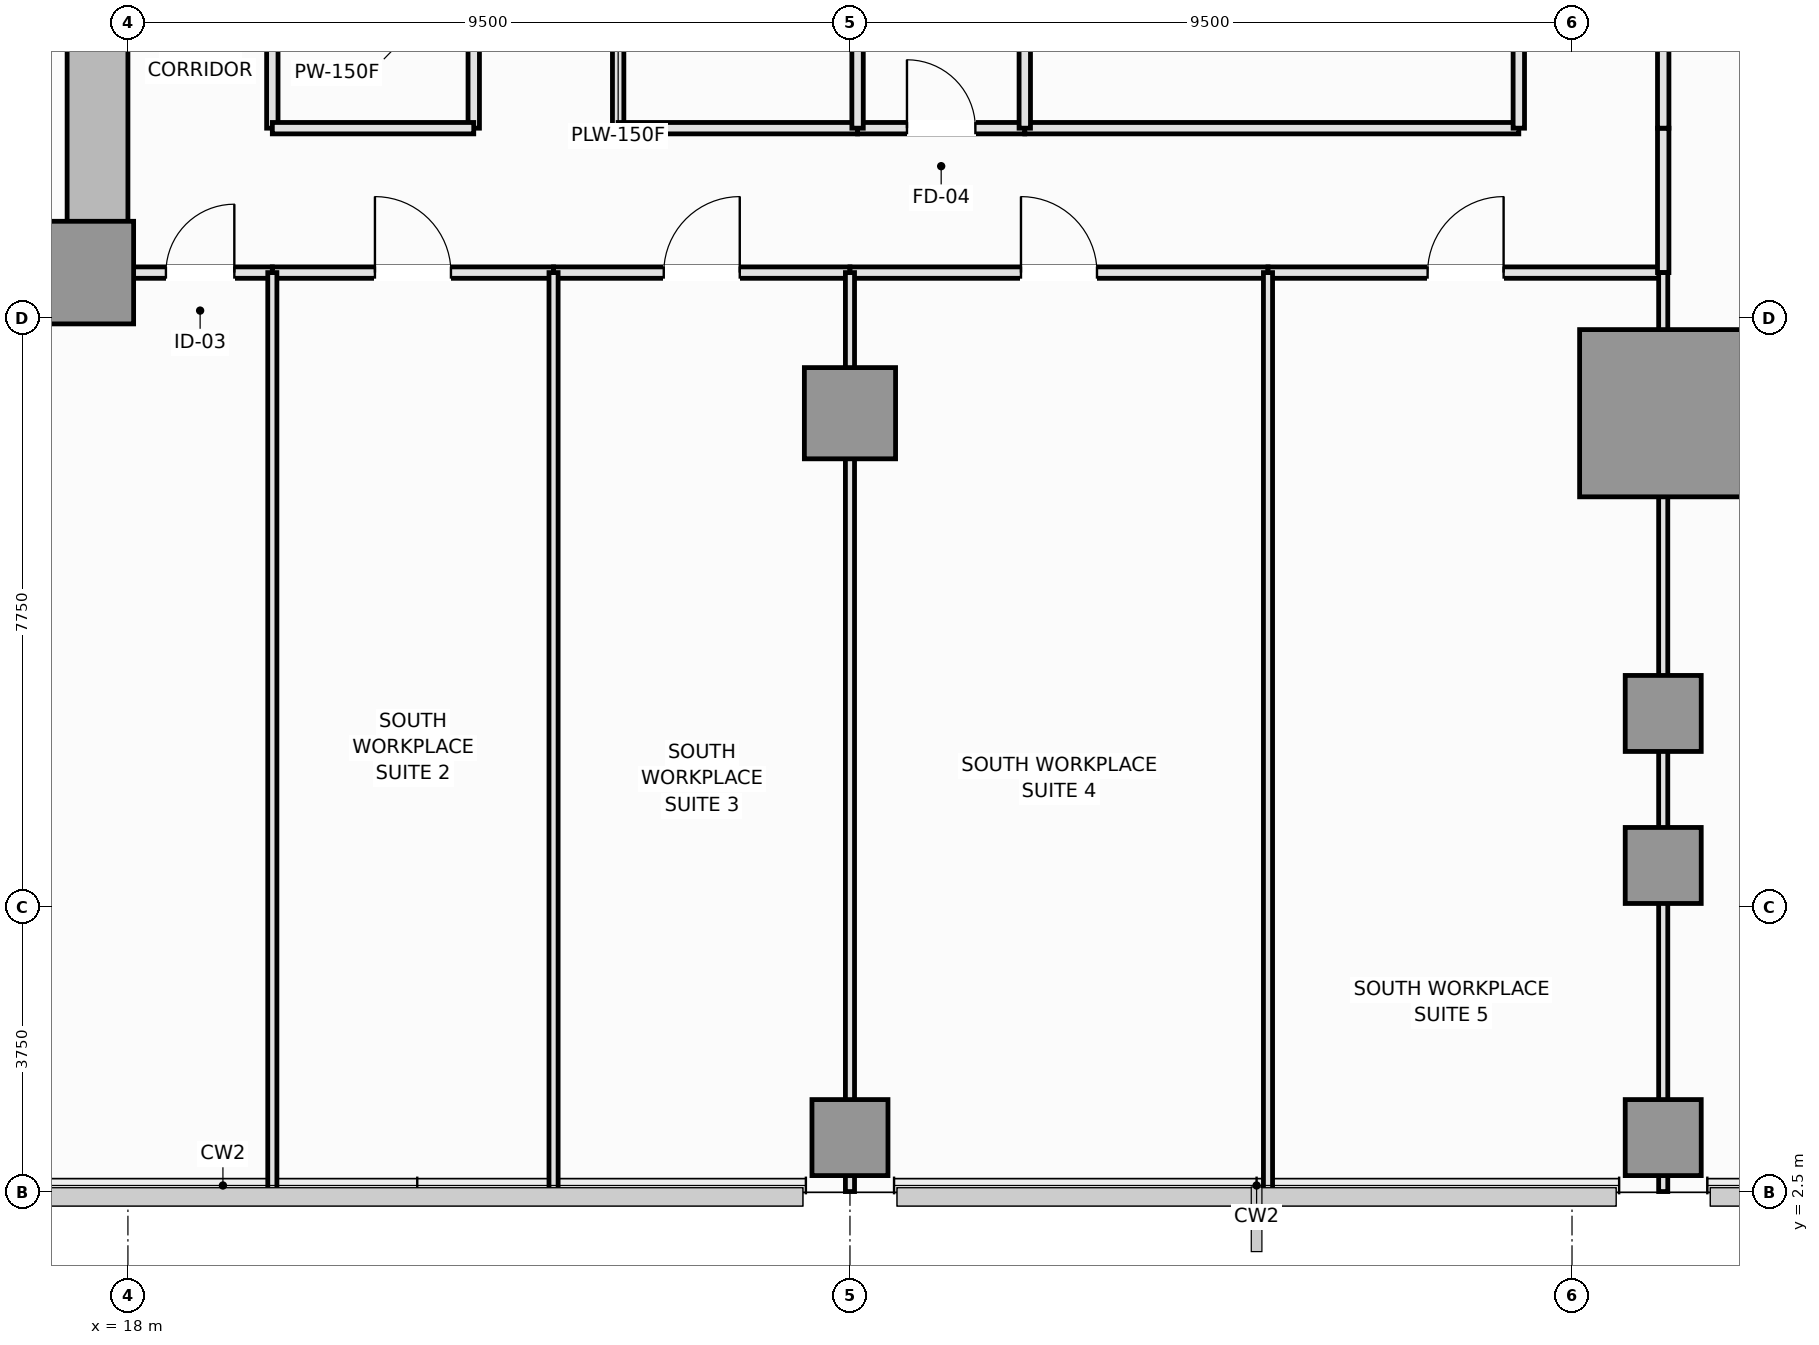
"""IFC4 building model, lengths in metres.
Left out: names, types, materials, properties, quantities, classifications, styles, units other than length and angle.
Written with IfcOpenShell. Run it as: python <this file> out.ifc"""

import sys

from ifc_helpers import new_model, si_unit, direction, frame, frame_2d, origin, origin_2d, place, context, subcontext, project, spatial, rectangle, extrude, element, fill, save


model = new_model("IFC4")
c1 = context("Model", 3, precision=1e-05, world=origin(), true_north=direction((0.0, 1.0)))
c2 = subcontext(c1, "Body", "Model", "MODEL_VIEW")
j1 = project(units=[si_unit("LENGTHUNIT", "METRE"), si_unit("PLANEANGLEUNIT", "RADIAN")], contexts=[c1])
p1 = place(None, origin())
s1 = spatial("IfcSite", under=j1, at=p1, CompositionType="ELEMENT")
p2 = place(p1, origin())
s2 = spatial("IfcBuilding", under=s1, at=p2, CompositionType="ELEMENT")
p3 = place(p2, frame((0.0, 0.0, 61.1)))
s3 = spatial("IfcBuildingStorey", under=s2, at=p3, CompositionType="ELEMENT", Elevation=61.1)
p4 = place(p3, frame((4.5, 14.4, 0.0), z_axis=(0.0, 0.0, 1.0), x_axis=(1.0, 0.0, 0.0)))
e1 = element("IfcWall", 1, at=p4, inside=s3, PredefinedType="SHEAR", context=c2, shape_type="SweptSolid", body=[
    extrude(rectangle(XDim=13.5, YDim=0.8, at=frame_2d((6.75, 0.0))), origin(), (0.0, 0.0, 1.0), 3.55),
])
p5 = place(p3, frame((17.6, 14.8, 0.0), z_axis=(0.0, 0.0, 1.0), x_axis=(0.0, 1.0, 0.0)))
e2 = element("IfcWall", 2, at=p5, inside=s3, PredefinedType="SHEAR", context=c2, shape_type="SweptSolid", body=[
    extrude(rectangle(XDim=8.65, YDim=0.8, at=frame_2d((4.325, 0.0))), origin(), (0.0, 0.0, 1.0), 3.55),
])
p6 = place(p5, frame((4.1, 0.0, 0.0)))
e3 = element("IfcOpeningElement", 3, at=p6, cuts=e2, PredefinedType="OPENING", context=c2, shape_type="SweptSolid", body=[
    extrude(rectangle(XDim=1.1, YDim=2.15, at=frame_2d((0.55, 1.075))), frame((0.0, 0.41, 0.0), z_axis=(0.0, -1.0, 0.0), x_axis=(1.0, 0.0, 0.0)), (0.0, 0.0, 1.0), 0.82),
])
p7 = place(p3, frame((17.4, 14.6, 0.0), z_axis=(0.0, 0.0, 1.0), x_axis=(1.0, 0.0, 0.0)))
e4 = element("IfcColumn", 4, at=p7, inside=s3, PredefinedType="PILASTER", context=c2, shape_type="SweptSolid", body=[
    extrude(rectangle(XDim=1.35, YDim=1.35, at=origin_2d()), origin(), (0.0, 0.0, 1.0), 3.55),
])
p8 = place(p3, frame((38.2, 12.75, 0.0), z_axis=(0.0, 0.0, 1.0), x_axis=(1.0, 0.0, 0.0)))
e5 = element("IfcColumn", 5, at=p8, inside=s3, PredefinedType="COLUMN", context=c2, shape_type="SweptSolid", body=[
    extrude(rectangle(XDim=2.2, YDim=2.2, at=origin_2d()), origin(), (0.0, 0.0, 1.0), 3.55),
])
p9 = place(p3, frame((27.5, 12.75, 0.0), z_axis=(0.0, 0.0, 1.0), x_axis=(1.0, 0.0, 0.0)))
e6 = element("IfcColumn", 6, at=p9, inside=s3, PredefinedType="COLUMN", context=c2, shape_type="SweptSolid", body=[
    extrude(rectangle(XDim=1.2, YDim=1.2, at=origin_2d()), origin(), (0.0, 0.0, 1.0), 3.55),
])
for number, where, z_axis, x_axis in (
    (7, (38.2, 6.8, 0.0), (0.0, 0.0, 1.0), (1.0, 0.0, 0.0)),
    (8, (38.2, 8.8, 0.0), (0.0, 0.0, 1.0), (1.0, 0.0, 0.0)),
    (9, (27.5, 3.22, 0.0), (0.0, 0.0, 1.0), (1.0, 0.0, 0.0)),
    (10, (38.2, 3.22, 0.0), (0.0, 0.0, 1.0), (1.0, 0.0, 0.0)),
):
    element("IfcColumn", number, at=place(p3, frame(where, z_axis=z_axis, x_axis=x_axis)), inside=s3, PredefinedType="COLUMN", context=c2, shape_type="SweptSolid", body=[
        extrude(rectangle(XDim=1.0, YDim=1.0, at=origin_2d()), origin(), (0.0, 0.0, 1.0), 3.55),
    ])
p10 = place(p3, frame((22.55, 16.5, 0.0), z_axis=(0.0, 0.0, 1.0), x_axis=(0.0, 1.0, 0.0)))
e11 = element("IfcWall", 11, at=p10, inside=s3, PredefinedType="PARTITIONING", context=c2, shape_type="SweptSolid", body=[
    extrude(rectangle(XDim=4.25, YDim=0.15, at=frame_2d((2.125, 0.0))), origin(), (0.0, 0.0, 1.0), 3.01),
])
p11 = place(p10, frame((1.625, 0.0, 0.0)))
e12 = element("IfcOpeningElement", 12, at=p11, cuts=e11, PredefinedType="OPENING", context=c2, shape_type="SweptSolid", body=[
    extrude(rectangle(XDim=1.0, YDim=2.15, at=frame_2d((0.5, 1.075))), frame((0.0, 0.085, 0.0), z_axis=(0.0, -1.0, 0.0), x_axis=(1.0, 0.0, 0.0)), (0.0, 0.0, 1.0), 0.17),
])
p12 = place(p3, frame((24.45, 16.5, 0.0), z_axis=(0.0, 0.0, 1.0), x_axis=(0.0, 1.0, 0.0)))
e13 = element("IfcWall", 13, at=p12, inside=s3, PredefinedType="PLUMBINGWALL", context=c2, shape_type="SweptSolid", body=[
    extrude(rectangle(XDim=3.1, YDim=0.15, at=frame_2d((1.55, 0.0))), origin(), (0.0, 0.0, 1.0), 3.37),
])
p13 = place(p12, frame((1.1, 0.0, 0.0)))
e14 = element("IfcOpeningElement", 14, at=p13, cuts=e13, PredefinedType="OPENING", context=c2, shape_type="SweptSolid", body=[
    extrude(rectangle(XDim=0.9, YDim=2.1, at=frame_2d((0.45, 1.05))), frame((0.0, 0.085, 0.0), z_axis=(0.0, -1.0, 0.0), x_axis=(1.0, 0.0, 0.0)), (0.0, 0.0, 1.0), 0.17),
])
p14 = place(p3, frame((19.9, 16.5, 0.0), z_axis=(0.0, 0.0, 1.0), x_axis=(0.0, 1.0, 0.0)))
e15 = element("IfcWall", 15, at=p14, inside=s3, PredefinedType="PARTITIONING", context=c2, shape_type="SweptSolid", body=[
    extrude(rectangle(XDim=4.25, YDim=0.15, at=frame_2d((2.125, 0.0))), origin(), (0.0, 0.0, 1.0), 3.37),
])
p15 = place(p3, frame((19.9, 16.5, 0.0), z_axis=(0.0, 0.0, 1.0), x_axis=(1.0, 0.0, 0.0)))
e16 = element("IfcWall", 16, at=p15, inside=s3, PredefinedType="PARTITIONING", context=c2, shape_type="SweptSolid", body=[
    extrude(rectangle(XDim=2.65, YDim=0.15, at=frame_2d((1.325, 0.0))), origin(), (0.0, 0.0, 1.0), 3.37),
])
p16 = place(p3, frame((24.45, 16.5, 0.0), z_axis=(0.0, 0.0, 1.0), x_axis=(1.0, 0.0, 0.0)))
e17 = element("IfcWall", 17, at=p16, inside=s3, PredefinedType="PLUMBINGWALL", context=c2, shape_type="SweptSolid", body=[
    extrude(rectangle(XDim=3.15, YDim=0.15, at=frame_2d((1.575, 0.0))), origin(), (0.0, 0.0, 1.0), 3.37),
])
p17 = place(p3, frame((27.6, 16.5, 0.0), z_axis=(0.0, 0.0, 1.0), x_axis=(1.0, 0.0, 0.0)))
e18 = element("IfcWall", 18, at=p17, inside=s3, PredefinedType="PLUMBINGWALL", context=c2, shape_type="SweptSolid", body=[
    extrude(rectangle(XDim=2.2, YDim=0.15, at=frame_2d((1.1, 0.0))), origin(), (0.0, 0.0, 1.0), 3.37),
])
p18 = place(p17, frame((0.65, 0.0, 0.0)))
e19 = element("IfcOpeningElement", 19, at=p18, cuts=e18, PredefinedType="OPENING", context=c2, shape_type="SweptSolid", body=[
    extrude(rectangle(XDim=0.9, YDim=2.1, at=frame_2d((0.45, 1.05))), frame((0.0, 0.085, 0.0), z_axis=(0.0, -1.0, 0.0), x_axis=(1.0, 0.0, 0.0)), (0.0, 0.0, 1.0), 0.17),
])
p19 = place(p3, frame((29.8, 16.5, 0.0), z_axis=(0.0, 0.0, 1.0), x_axis=(1.0, 0.0, 0.0)))
e20 = element("IfcWall", 20, at=p19, inside=s3, PredefinedType="PARTITIONING", context=c2, shape_type="SweptSolid", body=[
    extrude(rectangle(XDim=6.5, YDim=0.15, at=frame_2d((3.25, 0.0))), origin(), (0.0, 0.0, 1.0), 3.37),
])
p20 = place(p3, frame((18.0, 14.6, 0.0), z_axis=(0.0, 0.0, 1.0), x_axis=(1.0, 0.0, 0.0)))
e21 = element("IfcWall", 21, at=p20, inside=s3, PredefinedType="PARTITIONING", context=c2, shape_type="SweptSolid", body=[
    extrude(rectangle(XDim=1.9, YDim=0.15, at=frame_2d((0.95, 0.0))), origin(), (0.0, 0.0, 1.0), 3.37),
])
p21 = place(p20, frame((0.5, 0.0, 0.0)))
e22 = element("IfcOpeningElement", 22, at=p21, cuts=e21, PredefinedType="OPENING", context=c2, shape_type="SweptSolid", body=[
    extrude(rectangle(XDim=0.9, YDim=2.1, at=frame_2d((0.45, 1.05))), frame((0.0, 0.085, 0.0), z_axis=(0.0, -1.0, 0.0), x_axis=(1.0, 0.0, 0.0)), (0.0, 0.0, 1.0), 0.17),
])
p22 = place(p3, frame((19.9, 14.6, 0.0), z_axis=(0.0, 0.0, 1.0), x_axis=(1.0, 0.0, 0.0)))
e23 = element("IfcWall", 23, at=p22, inside=s3, PredefinedType="PARTITIONING", context=c2, shape_type="SweptSolid", body=[
    extrude(rectangle(XDim=3.7, YDim=0.15, at=frame_2d((1.85, 0.0))), origin(), (0.0, 0.0, 1.0), 3.37),
])
p23 = place(p22, frame((1.35, 0.0, 0.0)))
e24 = element("IfcOpeningElement", 24, at=p23, cuts=e23, PredefinedType="OPENING", context=c2, shape_type="SweptSolid", body=[
    extrude(rectangle(XDim=1.0, YDim=2.15, at=frame_2d((0.5, 1.075))), frame((0.0, 0.085, 0.0), z_axis=(0.0, -1.0, 0.0), x_axis=(1.0, 0.0, 0.0)), (0.0, 0.0, 1.0), 0.17),
])
p24 = place(p3, frame((23.6, 14.6, 0.0), z_axis=(0.0, 0.0, 1.0), x_axis=(1.0, 0.0, 0.0)))
e25 = element("IfcWall", 25, at=p24, inside=s3, PredefinedType="PARTITIONING", context=c2, shape_type="SweptSolid", body=[
    extrude(rectangle(XDim=3.9, YDim=0.15, at=frame_2d((1.95, 0.0))), origin(), (0.0, 0.0, 1.0), 3.37),
])
p25 = place(p24, frame((1.45, 0.0, 0.0)))
e26 = element("IfcOpeningElement", 26, at=p25, cuts=e25, PredefinedType="OPENING", context=c2, shape_type="SweptSolid", body=[
    extrude(rectangle(XDim=1.0, YDim=2.15, at=frame_2d((0.5, 1.075))), frame((0.0, 0.085, 0.0), z_axis=(0.0, -1.0, 0.0), x_axis=(1.0, 0.0, 0.0)), (0.0, 0.0, 1.0), 0.17),
])
p26 = place(p3, frame((27.5, 14.6, 0.0), z_axis=(0.0, 0.0, 1.0), x_axis=(1.0, 0.0, 0.0)))
e27 = element("IfcWall", 27, at=p26, inside=s3, PredefinedType="PARTITIONING", context=c2, shape_type="SweptSolid", body=[
    extrude(rectangle(XDim=5.5, YDim=0.15, at=frame_2d((2.75, 0.0))), origin(), (0.0, 0.0, 1.0), 3.37),
])
p27 = place(p26, frame((2.25, 0.0, 0.0)))
e28 = element("IfcOpeningElement", 28, at=p27, cuts=e27, PredefinedType="OPENING", context=c2, shape_type="SweptSolid", body=[
    extrude(rectangle(XDim=1.0, YDim=2.15, at=frame_2d((0.5, 1.075))), frame((0.0, 0.085, 0.0), z_axis=(0.0, -1.0, 0.0), x_axis=(1.0, 0.0, 0.0)), (0.0, 0.0, 1.0), 0.17),
])
p28 = place(p3, frame((33.0, 14.6, 0.0), z_axis=(0.0, 0.0, 1.0), x_axis=(1.0, 0.0, 0.0)))
e29 = element("IfcWall", 29, at=p28, inside=s3, PredefinedType="PARTITIONING", context=c2, shape_type="SweptSolid", body=[
    extrude(rectangle(XDim=5.2, YDim=0.15, at=frame_2d((2.6, 0.0))), origin(), (0.0, 0.0, 1.0), 3.37),
])
p29 = place(p28, frame((2.1, 0.0, 0.0)))
e30 = element("IfcOpeningElement", 30, at=p29, cuts=e29, PredefinedType="OPENING", context=c2, shape_type="SweptSolid", body=[
    extrude(rectangle(XDim=1.0, YDim=2.15, at=frame_2d((0.5, 1.075))), frame((0.0, 0.085, 0.0), z_axis=(0.0, -1.0, 0.0), x_axis=(1.0, 0.0, 0.0)), (0.0, 0.0, 1.0), 0.17),
])
p30 = place(p3, frame((38.2, 14.6, 0.0), z_axis=(0.0, 0.0, 1.0), x_axis=(0.0, 1.0, 0.0)))
e31 = element("IfcWall", 31, at=p30, inside=s3, PredefinedType="PARTITIONING", context=c2, shape_type="SweptSolid", body=[
    extrude(rectangle(XDim=1.9, YDim=0.15, at=frame_2d((0.95, 0.0))), origin(), (0.0, 0.0, 1.0), 2.82),
])
p31 = place(p3, frame((36.3, 16.5, 0.0), z_axis=(0.0, 0.0, 1.0), x_axis=(0.0, 1.0, 0.0)))
e32 = element("IfcWall", 32, at=p31, inside=s3, PredefinedType="PARTITIONING", context=c2, shape_type="SweptSolid", body=[
    extrude(rectangle(XDim=3.1, YDim=0.15, at=frame_2d((1.55, 0.0))), origin(), (0.0, 0.0, 1.0), 3.37),
])
p32 = place(p31, frame((1.485, 0.0, 0.0)))
e33 = element("IfcOpeningElement", 33, at=p32, cuts=e32, PredefinedType="OPENING", context=c2, shape_type="SweptSolid", body=[
    extrude(rectangle(XDim=1.0, YDim=2.15, at=frame_2d((0.5, 1.075))), frame((0.0, 0.085, 0.0), z_axis=(0.0, -1.0, 0.0), x_axis=(1.0, 0.0, 0.0)), (0.0, 0.0, 1.0), 0.17),
])
p33 = place(p3, frame((38.2, 16.5, 0.0), z_axis=(0.0, 0.0, 1.0), x_axis=(0.0, 1.0, 0.0)))
e34 = element("IfcWall", 34, at=p33, inside=s3, PredefinedType="PARTITIONING", context=c2, shape_type="SweptSolid", body=[
    extrude(rectangle(XDim=5.35, YDim=0.15, at=frame_2d((2.675, 0.0))), origin(), (0.0, 0.0, 1.0), 2.82),
])
p34 = place(p33, frame((2.988, 0.0, 0.0)))
e35 = element("IfcOpeningElement", 35, at=p34, cuts=e34, PredefinedType="OPENING", context=c2, shape_type="SweptSolid", body=[
    extrude(rectangle(XDim=1.0, YDim=2.15, at=frame_2d((0.5, 1.075))), frame((0.0, 0.085, 0.0), z_axis=(0.0, -1.0, 0.0), x_axis=(1.0, 0.0, 0.0)), (0.0, 0.0, 1.0), 0.17),
])
for number, where, z_axis, x_axis in (
    (36, (27.6, 16.5, 0.0), (0.0, 0.0, 1.0), (0.0, 1.0, 0.0)),
    (37, (29.8, 16.5, 0.0), (0.0, 0.0, 1.0), (0.0, 1.0, 0.0)),
):
    element("IfcWall", number, at=place(p3, frame(where, z_axis=z_axis, x_axis=x_axis)), inside=s3, PredefinedType="PLUMBINGWALL", context=c2, shape_type="SweptSolid", body=[
        extrude(rectangle(XDim=3.1, YDim=0.15, at=frame_2d((1.55, 0.0))), origin(), (0.0, 0.0, 1.0), 3.37),
    ])
for number, where, z_axis, x_axis in (
    (38, (19.9, 2.51, 0.0), (0.0, 0.0, 1.0), (0.0, 1.0, 0.0)),
    (39, (23.6, 2.51, 0.0), (0.0, 0.0, 1.0), (0.0, 1.0, 0.0)),
):
    element("IfcWall", number, at=place(p3, frame(where, z_axis=z_axis, x_axis=x_axis)), inside=s3, PredefinedType="PARTITIONING", context=c2, shape_type="SweptSolid", body=[
        extrude(rectangle(XDim=12.09, YDim=0.12, at=frame_2d((6.045, 0.0))), origin(), (0.0, 0.0, 1.0), 3.37),
    ])
p35 = place(p3, frame((27.5, 2.51, 0.0), z_axis=(0.0, 0.0, 1.0), x_axis=(0.0, 1.0, 0.0)))
e40 = element("IfcWall", 40, at=p35, inside=s3, PredefinedType="PARTITIONING", context=c2, shape_type="SweptSolid", body=[
    extrude(rectangle(XDim=12.09, YDim=0.12, at=frame_2d((6.045, 0.0))), origin(), (0.0, 0.0, 1.0), 2.82),
])
p36 = place(p3, frame((33.0, 2.51, 0.0), z_axis=(0.0, 0.0, 1.0), x_axis=(0.0, 1.0, 0.0)))
e41 = element("IfcWall", 41, at=p36, inside=s3, PredefinedType="PARTITIONING", context=c2, shape_type="SweptSolid", body=[
    extrude(rectangle(XDim=12.09, YDim=0.12, at=frame_2d((6.045, 0.0))), origin(), (0.0, 0.0, 1.0), 3.37),
])
p37 = place(p3, frame((38.2, 2.51, 0.0), z_axis=(0.0, 0.0, 1.0), x_axis=(0.0, 1.0, 0.0)))
e42 = element("IfcWall", 42, at=p37, inside=s3, PredefinedType="PARTITIONING", context=c2, shape_type="SweptSolid", body=[
    extrude(rectangle(XDim=12.09, YDim=0.12, at=frame_2d((6.045, 0.0))), origin(), (0.0, 0.0, 1.0), 2.82),
])
p38 = place(p18, origin())
e43 = element("IfcDoor", 43, at=p38, inside=s3, OperationType="SINGLE_SWING_LEFT", PredefinedType="DOOR", context=c2, shape_type="SweptSolid", body=[
    extrude(rectangle(XDim=0.9, YDim=2.1, at=frame_2d((0.45, 1.05))), frame((0.0, 0.025, 0.0), z_axis=(0.0, -1.0, 0.0), x_axis=(1.0, 0.0, 0.0)), (0.0, 0.0, 1.0), 0.05),
])
fill(e19, e43)
p39 = place(p21, origin())
e44 = element("IfcDoor", 44, at=p39, inside=s3, OperationType="SINGLE_SWING_RIGHT", PredefinedType="DOOR", context=c2, shape_type="SweptSolid", body=[
    extrude(rectangle(XDim=0.9, YDim=2.1, at=frame_2d((0.45, 1.05))), frame((0.0, 0.025, 0.0), z_axis=(0.0, -1.0, 0.0), x_axis=(1.0, 0.0, 0.0)), (0.0, 0.0, 1.0), 0.05),
])
fill(e22, e44)
p40 = place(p23, origin())
e45 = element("IfcDoor", 45, at=p40, inside=s3, OperationType="SINGLE_SWING_LEFT", PredefinedType="DOOR", context=c2, shape_type="SweptSolid", body=[
    extrude(rectangle(XDim=1.0, YDim=2.15, at=frame_2d((0.5, 1.075))), frame((0.0, 0.025, 0.0), z_axis=(0.0, -1.0, 0.0), x_axis=(1.0, 0.0, 0.0)), (0.0, 0.0, 1.0), 0.05),
])
fill(e24, e45)
p41 = place(p25, origin())
e46 = element("IfcDoor", 46, at=p41, inside=s3, OperationType="SINGLE_SWING_RIGHT", PredefinedType="DOOR", context=c2, shape_type="SweptSolid", body=[
    extrude(rectangle(XDim=1.0, YDim=2.15, at=frame_2d((0.5, 1.075))), frame((0.0, 0.025, 0.0), z_axis=(0.0, -1.0, 0.0), x_axis=(1.0, 0.0, 0.0)), (0.0, 0.0, 1.0), 0.05),
])
fill(e26, e46)
p42 = place(p27, origin())
e47 = element("IfcDoor", 47, at=p42, inside=s3, OperationType="SINGLE_SWING_LEFT", PredefinedType="DOOR", context=c2, shape_type="SweptSolid", body=[
    extrude(rectangle(XDim=1.0, YDim=2.15, at=frame_2d((0.5, 1.075))), frame((0.0, 0.025, 0.0), z_axis=(0.0, -1.0, 0.0), x_axis=(1.0, 0.0, 0.0)), (0.0, 0.0, 1.0), 0.05),
])
fill(e28, e47)
p43 = place(p29, origin())
e48 = element("IfcDoor", 48, at=p43, inside=s3, OperationType="SINGLE_SWING_RIGHT", PredefinedType="DOOR", context=c2, shape_type="SweptSolid", body=[
    extrude(rectangle(XDim=1.0, YDim=2.15, at=frame_2d((0.5, 1.075))), frame((0.0, 0.025, 0.0), z_axis=(0.0, -1.0, 0.0), x_axis=(1.0, 0.0, 0.0)), (0.0, 0.0, 1.0), 0.05),
])
fill(e30, e48)
save(model, sys.argv[1])
